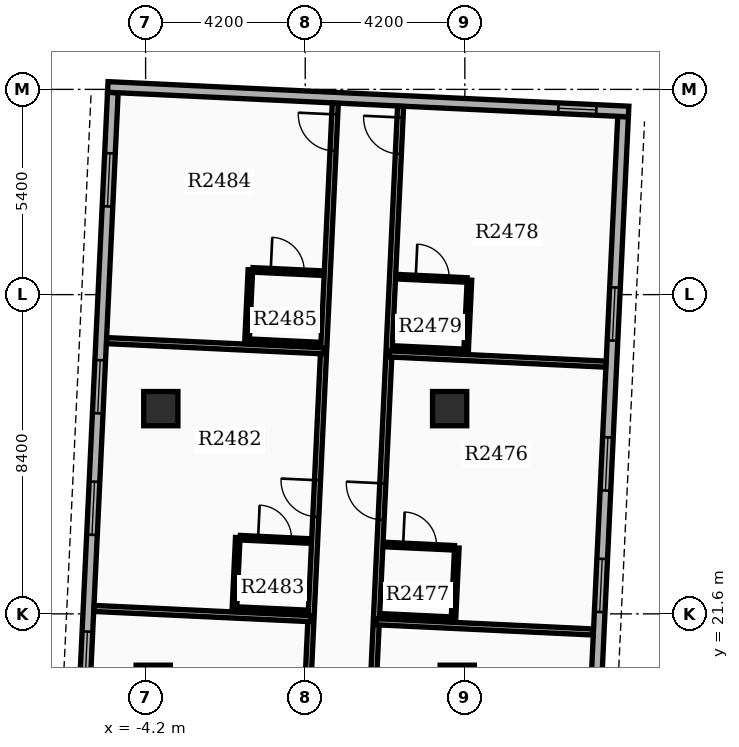
"""IFC4 building model, lengths in metres.
Left out: names, types, materials, properties, quantities, classifications, styles, units other than length and angle.
Written with IfcOpenShell. Run it as: python <this file> out.ifc"""

import sys

from ifc_helpers import new_model, si_unit, direction, frame, frame_2d, origin, origin_2d, place, context, subcontext, project, spatial, rectangle, extrude, element, fill, save


model = new_model("IFC4")
c1 = context("Model", 3, precision=1e-05, world=origin(), true_north=direction((0.0, 1.0)))
c2 = subcontext(c1, "Body", "Model", "MODEL_VIEW")
j1 = project(units=[si_unit("LENGTHUNIT", "METRE"), si_unit("PLANEANGLEUNIT", "RADIAN")], contexts=[c1])
p1 = place(None, origin())
s1 = spatial("IfcSite", under=j1, at=p1, CompositionType="ELEMENT")
p2 = place(p1, origin())
s2 = spatial("IfcBuilding", under=s1, at=p2, CompositionType="ELEMENT")
p3 = place(p2, frame((0.0, 0.0, 156.6)))
s3 = spatial("IfcBuildingStorey", under=s2, at=p3, CompositionType="ELEMENT", Elevation=156.6)
for number, where, z_axis, x_axis in (
    (1, (-4.0, 19.8, 0.0), (0.0, 0.0, 1.0), (1.0, 0.0, 0.0)),
    (2, (4.0, 19.8, 0.0), (0.0, 0.0, 1.0), (1.0, 0.0, 0.0)),
    (3, (-3.8, 27.0, 0.0), (0.0, 0.0, 1.0), (1.0, 0.0, 0.0)),
    (4, (3.8, 27.0, 0.0), (0.0, 0.0, 1.0), (1.0, 0.0, 0.0)),
):
    element("IfcColumn", number, at=place(p3, frame(where, z_axis=z_axis, x_axis=x_axis)), inside=s3, PredefinedType="COLUMN", context=c2, shape_type="SweptSolid", body=[
        extrude(rectangle(XDim=0.9, YDim=0.9, at=origin_2d()), origin(), (0.0, 0.0, 1.0), 3.9),
    ])
p4 = place(p3, frame((7.416, 14.607, 0.0), z_axis=(0.0, 0.0, 1.0), x_axis=(0.047103473814, 0.998890015344, 0.0)))
e5 = element("IfcWall", 5, at=p4, inside=s3, PredefinedType="STANDARD", context=c2, shape_type="SweptSolid", body=[
    extrude(rectangle(XDim=20.1, YDim=0.28, at=frame_2d((10.05, 0.0))), origin(), (0.0, 0.0, 1.0), 2.97),
])
p5 = place(p4, frame((1.6, 0.0, 0.8)))
e6 = element("IfcOpeningElement", 6, at=p5, cuts=e5, PredefinedType="OPENING", context=c2, shape_type="SweptSolid", body=[
    extrude(rectangle(XDim=1.4, YDim=1.6, at=frame_2d((0.7, 0.8))), frame((0.0, 0.15, 0.0), z_axis=(0.0, -1.0, 0.0), x_axis=(1.0, 0.0, 0.0)), (0.0, 0.0, 1.0), 0.3),
])
p6 = place(p4, frame((7.05, 0.0, 0.8)))
e7 = element("IfcOpeningElement", 7, at=p6, cuts=e5, PredefinedType="OPENING", context=c2, shape_type="SweptSolid", body=[
    extrude(rectangle(XDim=1.4, YDim=1.6, at=frame_2d((0.7, 0.8))), frame((0.0, 0.15, 0.0), z_axis=(0.0, -1.0, 0.0), x_axis=(1.0, 0.0, 0.0)), (0.0, 0.0, 1.0), 0.3),
])
p7 = place(p4, frame((10.25, 0.0, 0.8)))
e8 = element("IfcOpeningElement", 8, at=p7, cuts=e5, PredefinedType="OPENING", context=c2, shape_type="SweptSolid", body=[
    extrude(rectangle(XDim=1.4, YDim=1.6, at=frame_2d((0.7, 0.8))), frame((0.0, 0.15, 0.0), z_axis=(0.0, -1.0, 0.0), x_axis=(1.0, 0.0, 0.0)), (0.0, 0.0, 1.0), 0.3),
])
p8 = place(p4, frame((14.2, 0.0, 0.8)))
e9 = element("IfcOpeningElement", 9, at=p8, cuts=e5, PredefinedType="OPENING", context=c2, shape_type="SweptSolid", body=[
    extrude(rectangle(XDim=1.4, YDim=1.6, at=frame_2d((0.7, 0.8))), frame((0.0, 0.15, 0.0), z_axis=(0.0, -1.0, 0.0), x_axis=(1.0, 0.0, 0.0)), (0.0, 0.0, 1.0), 0.3),
])
p9 = place(p3, frame((-5.062, 35.318, 0.0), z_axis=(0.0, 0.0, 1.0), x_axis=(-0.047103473814, -0.998890015344, 0.0)))
e10 = element("IfcWall", 10, at=p9, inside=s3, PredefinedType="STANDARD", context=c2, shape_type="SweptSolid", body=[
    extrude(rectangle(XDim=20.1, YDim=0.28, at=frame_2d((10.05, 0.0))), origin(), (0.0, 0.0, 1.0), 2.97),
])
p10 = place(p9, frame((1.6, 0.0, 0.8)))
e11 = element("IfcOpeningElement", 11, at=p10, cuts=e10, PredefinedType="OPENING", context=c2, shape_type="SweptSolid", body=[
    extrude(rectangle(XDim=1.4, YDim=1.6, at=frame_2d((0.7, 0.8))), frame((0.0, 0.15, 0.0), z_axis=(0.0, -1.0, 0.0), x_axis=(1.0, 0.0, 0.0)), (0.0, 0.0, 1.0), 0.3),
])
p11 = place(p9, frame((7.05, 0.0, 0.8)))
e12 = element("IfcOpeningElement", 12, at=p11, cuts=e10, PredefinedType="OPENING", context=c2, shape_type="SweptSolid", body=[
    extrude(rectangle(XDim=1.4, YDim=1.6, at=frame_2d((0.7, 0.8))), frame((0.0, 0.15, 0.0), z_axis=(0.0, -1.0, 0.0), x_axis=(1.0, 0.0, 0.0)), (0.0, 0.0, 1.0), 0.3),
])
p12 = place(p9, frame((10.25, 0.0, 0.8)))
e13 = element("IfcOpeningElement", 13, at=p12, cuts=e10, PredefinedType="OPENING", context=c2, shape_type="SweptSolid", body=[
    extrude(rectangle(XDim=1.4, YDim=1.6, at=frame_2d((0.7, 0.8))), frame((0.0, 0.15, 0.0), z_axis=(0.0, -1.0, 0.0), x_axis=(1.0, 0.0, 0.0)), (0.0, 0.0, 1.0), 0.3),
])
p13 = place(p9, frame((14.2, 0.0, 0.8)))
e14 = element("IfcOpeningElement", 14, at=p13, cuts=e10, PredefinedType="OPENING", context=c2, shape_type="SweptSolid", body=[
    extrude(rectangle(XDim=1.4, YDim=1.6, at=frame_2d((0.7, 0.8))), frame((0.0, 0.15, 0.0), z_axis=(0.0, -1.0, 0.0), x_axis=(1.0, 0.0, 0.0)), (0.0, 0.0, 1.0), 0.3),
])
p14 = place(p3, frame((8.51, 34.818, 0.0), z_axis=(0.0, 0.0, 1.0), x_axis=(-0.998890092147, 0.047101845086, 0.0)))
e15 = element("IfcWall", 15, at=p14, inside=s3, PredefinedType="STANDARD", context=c2, shape_type="SweptSolid", body=[
    extrude(rectangle(XDim=13.72, YDim=0.28, at=frame_2d((6.86, 0.0))), origin(), (0.0, 0.0, 1.0), 2.97),
])
p15 = place(p14, frame((0.85, 0.0, 0.85)))
e16 = element("IfcOpeningElement", 16, at=p15, cuts=e15, PredefinedType="OPENING", context=c2, shape_type="SweptSolid", body=[
    extrude(rectangle(XDim=1.0, YDim=1.5, at=frame_2d((0.5, 0.75))), frame((0.0, 0.15, 0.0), z_axis=(0.0, -1.0, 0.0), x_axis=(1.0, 0.0, 0.0)), (0.0, 0.0, 1.0), 0.3),
])
p16 = place(p3, frame((1.559, 14.793, 0.0), z_axis=(0.0, 0.0, 1.0), x_axis=(0.047105352469, 0.998889926753, 0.0)))
e17 = element("IfcWall", 17, at=p16, inside=s3, PredefinedType="PARTITIONING", context=c2, shape_type="SweptSolid", body=[
    extrude(rectangle(XDim=20.182, YDim=0.16, at=frame_2d((10.091, 0.0))), origin(), (0.0, 0.0, 1.0), 2.96),
])
p17 = place(p16, frame((2.641, 0.0, 0.0)))
e18 = element("IfcOpeningElement", 18, at=p17, cuts=e17, PredefinedType="OPENING", context=c2, shape_type="SweptSolid", body=[
    extrude(rectangle(XDim=0.96, YDim=2.15, at=frame_2d((0.48, 1.075))), frame((0.0, 0.09, 0.0), z_axis=(0.0, -1.0, 0.0), x_axis=(1.0, 0.0, 0.0)), (0.0, 0.0, 1.0), 0.18),
])
p18 = place(p16, frame((9.293, 0.0, 0.0)))
e19 = element("IfcOpeningElement", 19, at=p18, cuts=e17, PredefinedType="OPENING", context=c2, shape_type="SweptSolid", body=[
    extrude(rectangle(XDim=0.96, YDim=2.15, at=frame_2d((0.48, 1.075))), frame((0.0, 0.09, 0.0), z_axis=(0.0, -1.0, 0.0), x_axis=(1.0, 0.0, 0.0)), (0.0, 0.0, 1.0), 0.18),
])
p19 = place(p16, frame((18.93, 0.0, 0.0)))
e20 = element("IfcOpeningElement", 20, at=p19, cuts=e17, PredefinedType="OPENING", context=c2, shape_type="SweptSolid", body=[
    extrude(rectangle(XDim=0.96, YDim=2.15, at=frame_2d((0.48, 1.075))), frame((0.0, 0.09, 0.0), z_axis=(0.0, -1.0, 0.0), x_axis=(1.0, 0.0, 0.0)), (0.0, 0.0, 1.0), 0.18),
])
for number, where, z_axis, x_axis in (
    (21, (1.87, 21.393, 0.0), (0.0, 0.0, 1.0), (0.999, -0.047, 0.0)),
    (22, (2.202, 28.44, 0.0), (0.0, 0.0, 1.0), (0.999, -0.047, 0.0)),
):
    element("IfcWall", number, at=place(p3, frame(where, z_axis=z_axis, x_axis=x_axis)), inside=s3, PredefinedType="PARTITIONING", context=c2, shape_type="SweptSolid", body=[
        extrude(rectangle(XDim=5.712, YDim=0.16, at=frame_2d((2.856, 0.0))), origin(), (0.0, 0.0, 1.0), 2.96),
    ])
p20 = place(p3, frame((2.106, 23.424, 0.0), z_axis=(0.0, 0.0, 1.0), x_axis=(0.998890786574, -0.047087116047, 0.0)))
e23 = element("IfcWall", 23, at=p20, inside=s3, PredefinedType="PARTITIONING", context=c2, shape_type="SweptSolid", body=[
    extrude(rectangle(XDim=1.82, YDim=0.12, at=frame_2d((0.91, 0.0))), origin(), (0.0, 0.0, 1.0), 2.96),
])
p21 = place(p20, frame((0.47, 0.0, 0.0)))
e24 = element("IfcOpeningElement", 24, at=p21, cuts=e23, PredefinedType="OPENING", context=c2, shape_type="SweptSolid", body=[
    extrude(rectangle(XDim=0.88, YDim=2.1, at=frame_2d((0.44, 1.05))), frame((0.0, 0.07, 0.0), z_axis=(0.0, -1.0, 0.0), x_axis=(1.0, 0.0, 0.0)), (0.0, 0.0, 1.0), 0.14),
])
p22 = place(p3, frame((2.017, 21.546, 0.0), z_axis=(0.0, 0.0, 1.0), x_axis=(0.998891083954, -0.047080807099, 0.0)))
e25 = element("IfcWall", 25, at=p22, inside=s3, PredefinedType="PARTITIONING", context=c2, shape_type="SweptSolid", body=[
    extrude(rectangle(XDim=1.82, YDim=0.12, at=frame_2d((0.91, 0.0))), origin(), (0.0, 0.0, 1.0), 2.96),
])
p23 = place(p3, frame((3.9, 21.457, 0.0), z_axis=(0.0, 0.0, 1.0), x_axis=(0.047139425368, 0.998888319371, 0.0)))
e26 = element("IfcWall", 26, at=p23, inside=s3, PredefinedType="PARTITIONING", context=c2, shape_type="SweptSolid", body=[
    extrude(rectangle(XDim=1.88, YDim=0.12, at=frame_2d((0.94, 0.0))), origin(), (0.0, 0.0, 1.0), 2.96),
])
p24 = place(p3, frame((2.438, 30.471, 0.0), z_axis=(0.0, 0.0, 1.0), x_axis=(0.998891083954, -0.047080807099, 0.0)))
e27 = element("IfcWall", 27, at=p24, inside=s3, PredefinedType="PARTITIONING", context=c2, shape_type="SweptSolid", body=[
    extrude(rectangle(XDim=1.82, YDim=0.12, at=frame_2d((0.91, 0.0))), origin(), (0.0, 0.0, 1.0), 2.96),
])
p25 = place(p24, frame((0.47, 0.0, 0.0)))
e28 = element("IfcOpeningElement", 28, at=p25, cuts=e27, PredefinedType="OPENING", context=c2, shape_type="SweptSolid", body=[
    extrude(rectangle(XDim=0.88, YDim=2.1, at=frame_2d((0.44, 1.05))), frame((0.0, 0.07, 0.0), z_axis=(0.0, -1.0, 0.0), x_axis=(1.0, 0.0, 0.0)), (0.0, 0.0, 1.0), 0.14),
])
p26 = place(p3, frame((2.35, 28.593, 0.0), z_axis=(0.0, 0.0, 1.0), x_axis=(0.998890786574, -0.047087116047, 0.0)))
e29 = element("IfcWall", 29, at=p26, inside=s3, PredefinedType="PARTITIONING", context=c2, shape_type="SweptSolid", body=[
    extrude(rectangle(XDim=1.82, YDim=0.12, at=frame_2d((0.91, 0.0))), origin(), (0.0, 0.0, 1.0), 2.96),
])
p27 = place(p3, frame((4.232, 28.504, 0.0), z_axis=(0.0, 0.0, 1.0), x_axis=(0.047145540913, 0.998888030748, 0.0)))
e30 = element("IfcWall", 30, at=p27, inside=s3, PredefinedType="PARTITIONING", context=c2, shape_type="SweptSolid", body=[
    extrude(rectangle(XDim=1.88, YDim=0.12, at=frame_2d((0.94, 0.0))), origin(), (0.0, 0.0, 1.0), 2.96),
])
p28 = place(p3, frame((-0.159, 14.874, 0.0), z_axis=(0.0, 0.0, 1.0), x_axis=(0.047105352469, 0.998889926753, 0.0)))
e31 = element("IfcWall", 31, at=p28, inside=s3, PredefinedType="PARTITIONING", context=c2, shape_type="SweptSolid", body=[
    extrude(rectangle(XDim=20.182, YDim=0.16, at=frame_2d((10.091, 0.0))), origin(), (0.0, 0.0, 1.0), 2.96),
])
p29 = place(p28, frame((2.641, 0.0, 0.0)))
e32 = element("IfcOpeningElement", 32, at=p29, cuts=e31, PredefinedType="OPENING", context=c2, shape_type="SweptSolid", body=[
    extrude(rectangle(XDim=0.96, YDim=2.15, at=frame_2d((0.48, 1.075))), frame((0.0, 0.09, 0.0), z_axis=(0.0, -1.0, 0.0), x_axis=(1.0, 0.0, 0.0)), (0.0, 0.0, 1.0), 0.18),
])
p30 = place(p28, frame((9.293, 0.0, 0.0)))
e33 = element("IfcOpeningElement", 33, at=p30, cuts=e31, PredefinedType="OPENING", context=c2, shape_type="SweptSolid", body=[
    extrude(rectangle(XDim=0.96, YDim=2.15, at=frame_2d((0.48, 1.075))), frame((0.0, 0.09, 0.0), z_axis=(0.0, -1.0, 0.0), x_axis=(1.0, 0.0, 0.0)), (0.0, 0.0, 1.0), 0.18),
])
p31 = place(p28, frame((18.93, 0.0, 0.0)))
e34 = element("IfcOpeningElement", 34, at=p31, cuts=e31, PredefinedType="OPENING", context=c2, shape_type="SweptSolid", body=[
    extrude(rectangle(XDim=0.96, YDim=2.15, at=frame_2d((0.48, 1.075))), frame((0.0, 0.09, 0.0), z_axis=(0.0, -1.0, 0.0), x_axis=(1.0, 0.0, 0.0)), (0.0, 0.0, 1.0), 0.18),
])
p32 = place(p3, frame((0.152, 21.474, 0.0), z_axis=(0.0, 0.0, 1.0), x_axis=(-0.998890078534, 0.047102133785, 0.0)))
e35 = element("IfcWall", 35, at=p32, inside=s3, PredefinedType="PARTITIONING", context=c2, shape_type="SweptSolid", body=[
    extrude(rectangle(XDim=5.712, YDim=0.16, at=frame_2d((2.856, 0.0))), origin(), (0.0, 0.0, 1.0), 2.96),
])
p33 = place(p3, frame((0.484, 28.521, 0.0), z_axis=(0.0, 0.0, 1.0), x_axis=(-0.998892183303, 0.047057476951, 0.0)))
e36 = element("IfcWall", 36, at=p33, inside=s3, PredefinedType="PARTITIONING", context=c2, shape_type="SweptSolid", body=[
    extrude(rectangle(XDim=5.712, YDim=0.16, at=frame_2d((2.856, 0.0))), origin(), (0.0, 0.0, 1.0), 2.96),
])
p34 = place(p3, frame((-1.71, 23.604, 0.0), z_axis=(0.0, 0.0, 1.0), x_axis=(0.998890786574, -0.047087116047, 0.0)))
e37 = element("IfcWall", 37, at=p34, inside=s3, PredefinedType="PARTITIONING", context=c2, shape_type="SweptSolid", body=[
    extrude(rectangle(XDim=1.82, YDim=0.12, at=frame_2d((0.91, 0.0))), origin(), (0.0, 0.0, 1.0), 2.96),
])
p35 = place(p34, frame((0.47, 0.0, 0.0)))
e38 = element("IfcOpeningElement", 38, at=p35, cuts=e37, PredefinedType="OPENING", context=c2, shape_type="SweptSolid", body=[
    extrude(rectangle(XDim=0.88, YDim=2.1, at=frame_2d((0.44, 1.05))), frame((0.0, 0.07, 0.0), z_axis=(0.0, -1.0, 0.0), x_axis=(1.0, 0.0, 0.0)), (0.0, 0.0, 1.0), 0.14),
])
p36 = place(p3, frame((-1.799, 21.726, 0.0), z_axis=(0.0, 0.0, 1.0), x_axis=(0.998890786574, -0.047087116047, 0.0)))
e39 = element("IfcWall", 39, at=p36, inside=s3, PredefinedType="PARTITIONING", context=c2, shape_type="SweptSolid", body=[
    extrude(rectangle(XDim=1.82, YDim=0.12, at=frame_2d((0.91, 0.0))), origin(), (0.0, 0.0, 1.0), 2.96),
])
p37 = place(p3, frame((-1.864, 21.729, 0.0), z_axis=(0.0, 0.0, 1.0), x_axis=(0.047145540913, 0.998888030748, 0.0)))
e40 = element("IfcWall", 40, at=p37, inside=s3, PredefinedType="PARTITIONING", context=c2, shape_type="SweptSolid", body=[
    extrude(rectangle(XDim=1.88, YDim=0.12, at=frame_2d((0.94, 0.0))), origin(), (0.0, 0.0, 1.0), 2.96),
])
p38 = place(p3, frame((-1.378, 30.651, 0.0), z_axis=(0.0, 0.0, 1.0), x_axis=(0.998890786574, -0.047087116047, 0.0)))
e41 = element("IfcWall", 41, at=p38, inside=s3, PredefinedType="PARTITIONING", context=c2, shape_type="SweptSolid", body=[
    extrude(rectangle(XDim=1.82, YDim=0.12, at=frame_2d((0.91, 0.0))), origin(), (0.0, 0.0, 1.0), 2.96),
])
p39 = place(p38, frame((0.47, 0.0, 0.0)))
e42 = element("IfcOpeningElement", 42, at=p39, cuts=e41, PredefinedType="OPENING", context=c2, shape_type="SweptSolid", body=[
    extrude(rectangle(XDim=0.88, YDim=2.1, at=frame_2d((0.44, 1.05))), frame((0.0, 0.07, 0.0), z_axis=(0.0, -1.0, 0.0), x_axis=(1.0, 0.0, 0.0)), (0.0, 0.0, 1.0), 0.14),
])
p40 = place(p3, frame((-1.466, 28.773, 0.0), z_axis=(0.0, 0.0, 1.0), x_axis=(0.998891083954, -0.047080807099, 0.0)))
e43 = element("IfcWall", 43, at=p40, inside=s3, PredefinedType="PARTITIONING", context=c2, shape_type="SweptSolid", body=[
    extrude(rectangle(XDim=1.82, YDim=0.12, at=frame_2d((0.91, 0.0))), origin(), (0.0, 0.0, 1.0), 2.96),
])
p41 = place(p3, frame((-1.531, 28.776, 0.0), z_axis=(0.0, 0.0, 1.0), x_axis=(0.047139425368, 0.998888319371, 0.0)))
e44 = element("IfcWall", 44, at=p41, inside=s3, PredefinedType="PARTITIONING", context=c2, shape_type="SweptSolid", body=[
    extrude(rectangle(XDim=1.88, YDim=0.12, at=frame_2d((0.94, 0.0))), origin(), (0.0, 0.0, 1.0), 2.96),
])
p42 = place(p6, origin())
e45 = element("IfcWindow", 45, at=p42, inside=s3, PartitioningType="SINGLE_PANEL", PredefinedType="WINDOW", context=c2, shape_type="SweptSolid", body=[
    extrude(rectangle(XDim=1.4, YDim=1.6, at=frame_2d((0.7, 0.8))), frame((0.0, 0.03, 0.0), z_axis=(0.0, -1.0, 0.0), x_axis=(1.0, 0.0, 0.0)), (0.0, 0.0, 1.0), 0.06),
])
fill(e7, e45)
p43 = place(p7, origin())
e46 = element("IfcWindow", 46, at=p43, inside=s3, PartitioningType="SINGLE_PANEL", PredefinedType="WINDOW", context=c2, shape_type="SweptSolid", body=[
    extrude(rectangle(XDim=1.4, YDim=1.6, at=frame_2d((0.7, 0.8))), frame((0.0, 0.03, 0.0), z_axis=(0.0, -1.0, 0.0), x_axis=(1.0, 0.0, 0.0)), (0.0, 0.0, 1.0), 0.06),
])
fill(e8, e46)
p44 = place(p8, origin())
e47 = element("IfcWindow", 47, at=p44, inside=s3, PartitioningType="SINGLE_PANEL", PredefinedType="WINDOW", context=c2, shape_type="SweptSolid", body=[
    extrude(rectangle(XDim=1.4, YDim=1.6, at=frame_2d((0.7, 0.8))), frame((0.0, 0.03, 0.0), z_axis=(0.0, -1.0, 0.0), x_axis=(1.0, 0.0, 0.0)), (0.0, 0.0, 1.0), 0.06),
])
fill(e9, e47)
p45 = place(p10, origin())
e48 = element("IfcWindow", 48, at=p45, inside=s3, PartitioningType="SINGLE_PANEL", PredefinedType="WINDOW", context=c2, shape_type="SweptSolid", body=[
    extrude(rectangle(XDim=1.4, YDim=1.6, at=frame_2d((0.7, 0.8))), frame((0.0, 0.03, 0.0), z_axis=(0.0, -1.0, 0.0), x_axis=(1.0, 0.0, 0.0)), (0.0, 0.0, 1.0), 0.06),
])
fill(e11, e48)
p46 = place(p11, origin())
e49 = element("IfcWindow", 49, at=p46, inside=s3, PartitioningType="SINGLE_PANEL", PredefinedType="WINDOW", context=c2, shape_type="SweptSolid", body=[
    extrude(rectangle(XDim=1.4, YDim=1.6, at=frame_2d((0.7, 0.8))), frame((0.0, 0.03, 0.0), z_axis=(0.0, -1.0, 0.0), x_axis=(1.0, 0.0, 0.0)), (0.0, 0.0, 1.0), 0.06),
])
fill(e12, e49)
p47 = place(p12, origin())
e50 = element("IfcWindow", 50, at=p47, inside=s3, PartitioningType="SINGLE_PANEL", PredefinedType="WINDOW", context=c2, shape_type="SweptSolid", body=[
    extrude(rectangle(XDim=1.4, YDim=1.6, at=frame_2d((0.7, 0.8))), frame((0.0, 0.03, 0.0), z_axis=(0.0, -1.0, 0.0), x_axis=(1.0, 0.0, 0.0)), (0.0, 0.0, 1.0), 0.06),
])
fill(e13, e50)
p48 = place(p13, origin())
e51 = element("IfcWindow", 51, at=p48, inside=s3, PartitioningType="SINGLE_PANEL", PredefinedType="WINDOW", context=c2, shape_type="SweptSolid", body=[
    extrude(rectangle(XDim=1.4, YDim=1.6, at=frame_2d((0.7, 0.8))), frame((0.0, 0.03, 0.0), z_axis=(0.0, -1.0, 0.0), x_axis=(1.0, 0.0, 0.0)), (0.0, 0.0, 1.0), 0.06),
])
fill(e14, e51)
p49 = place(p15, origin())
e52 = element("IfcWindow", 52, at=p49, inside=s3, PartitioningType="SINGLE_PANEL", PredefinedType="WINDOW", context=c2, shape_type="SweptSolid", body=[
    extrude(rectangle(XDim=1.0, YDim=1.5, at=frame_2d((0.5, 0.75))), frame((0.0, 0.03, 0.0), z_axis=(0.0, -1.0, 0.0), x_axis=(1.0, 0.0, 0.0)), (0.0, 0.0, 1.0), 0.06),
])
fill(e16, e52)
p50 = place(p18, origin())
e53 = element("IfcDoor", 53, at=p50, inside=s3, OperationType="SINGLE_SWING_RIGHT", PredefinedType="DOOR", context=c2, shape_type="SweptSolid", body=[
    extrude(rectangle(XDim=0.96, YDim=2.15, at=frame_2d((0.48, 1.075))), frame((0.0, 0.025, 0.0), z_axis=(0.0, -1.0, 0.0), x_axis=(1.0, 0.0, 0.0)), (0.0, 0.0, 1.0), 0.05),
])
fill(e19, e53)
p51 = place(p21, origin())
e54 = element("IfcDoor", 54, at=p51, inside=s3, OperationType="SINGLE_SWING_LEFT", PredefinedType="DOOR", context=c2, shape_type="SweptSolid", body=[
    extrude(rectangle(XDim=0.88, YDim=2.1, at=frame_2d((0.44, 1.05))), frame((0.0, 0.025, 0.0), z_axis=(0.0, -1.0, 0.0), x_axis=(1.0, 0.0, 0.0)), (0.0, 0.0, 1.0), 0.05),
])
fill(e24, e54)
p52 = place(p19, origin())
e55 = element("IfcDoor", 55, at=p52, inside=s3, OperationType="SINGLE_SWING_RIGHT", PredefinedType="DOOR", context=c2, shape_type="SweptSolid", body=[
    extrude(rectangle(XDim=0.96, YDim=2.15, at=frame_2d((0.48, 1.075))), frame((0.0, 0.025, 0.0), z_axis=(0.0, -1.0, 0.0), x_axis=(1.0, 0.0, 0.0)), (0.0, 0.0, 1.0), 0.05),
])
fill(e20, e55)
p53 = place(p25, origin())
e56 = element("IfcDoor", 56, at=p53, inside=s3, OperationType="SINGLE_SWING_LEFT", PredefinedType="DOOR", context=c2, shape_type="SweptSolid", body=[
    extrude(rectangle(XDim=0.88, YDim=2.1, at=frame_2d((0.44, 1.05))), frame((0.0, 0.025, 0.0), z_axis=(0.0, -1.0, 0.0), x_axis=(1.0, 0.0, 0.0)), (0.0, 0.0, 1.0), 0.05),
])
fill(e28, e56)
p54 = place(p30, origin())
e57 = element("IfcDoor", 57, at=p54, inside=s3, OperationType="SINGLE_SWING_RIGHT", PredefinedType="DOOR", context=c2, shape_type="SweptSolid", body=[
    extrude(rectangle(XDim=0.96, YDim=2.15, at=frame_2d((0.48, 1.075))), frame((0.0, 0.025, 0.0), z_axis=(0.0, -1.0, 0.0), x_axis=(1.0, 0.0, 0.0)), (0.0, 0.0, 1.0), 0.05),
])
fill(e33, e57)
p55 = place(p35, origin())
e58 = element("IfcDoor", 58, at=p55, inside=s3, OperationType="SINGLE_SWING_LEFT", PredefinedType="DOOR", context=c2, shape_type="SweptSolid", body=[
    extrude(rectangle(XDim=0.88, YDim=2.1, at=frame_2d((0.44, 1.05))), frame((0.0, 0.025, 0.0), z_axis=(0.0, -1.0, 0.0), x_axis=(1.0, 0.0, 0.0)), (0.0, 0.0, 1.0), 0.05),
])
fill(e38, e58)
p56 = place(p31, origin())
e59 = element("IfcDoor", 59, at=p56, inside=s3, OperationType="SINGLE_SWING_RIGHT", PredefinedType="DOOR", context=c2, shape_type="SweptSolid", body=[
    extrude(rectangle(XDim=0.96, YDim=2.15, at=frame_2d((0.48, 1.075))), frame((0.0, 0.025, 0.0), z_axis=(0.0, -1.0, 0.0), x_axis=(1.0, 0.0, 0.0)), (0.0, 0.0, 1.0), 0.05),
])
fill(e34, e59)
p57 = place(p39, origin())
e60 = element("IfcDoor", 60, at=p57, inside=s3, OperationType="SINGLE_SWING_LEFT", PredefinedType="DOOR", context=c2, shape_type="SweptSolid", body=[
    extrude(rectangle(XDim=0.88, YDim=2.1, at=frame_2d((0.44, 1.05))), frame((0.0, 0.025, 0.0), z_axis=(0.0, -1.0, 0.0), x_axis=(1.0, 0.0, 0.0)), (0.0, 0.0, 1.0), 0.05),
])
fill(e42, e60)
save(model, sys.argv[1])
